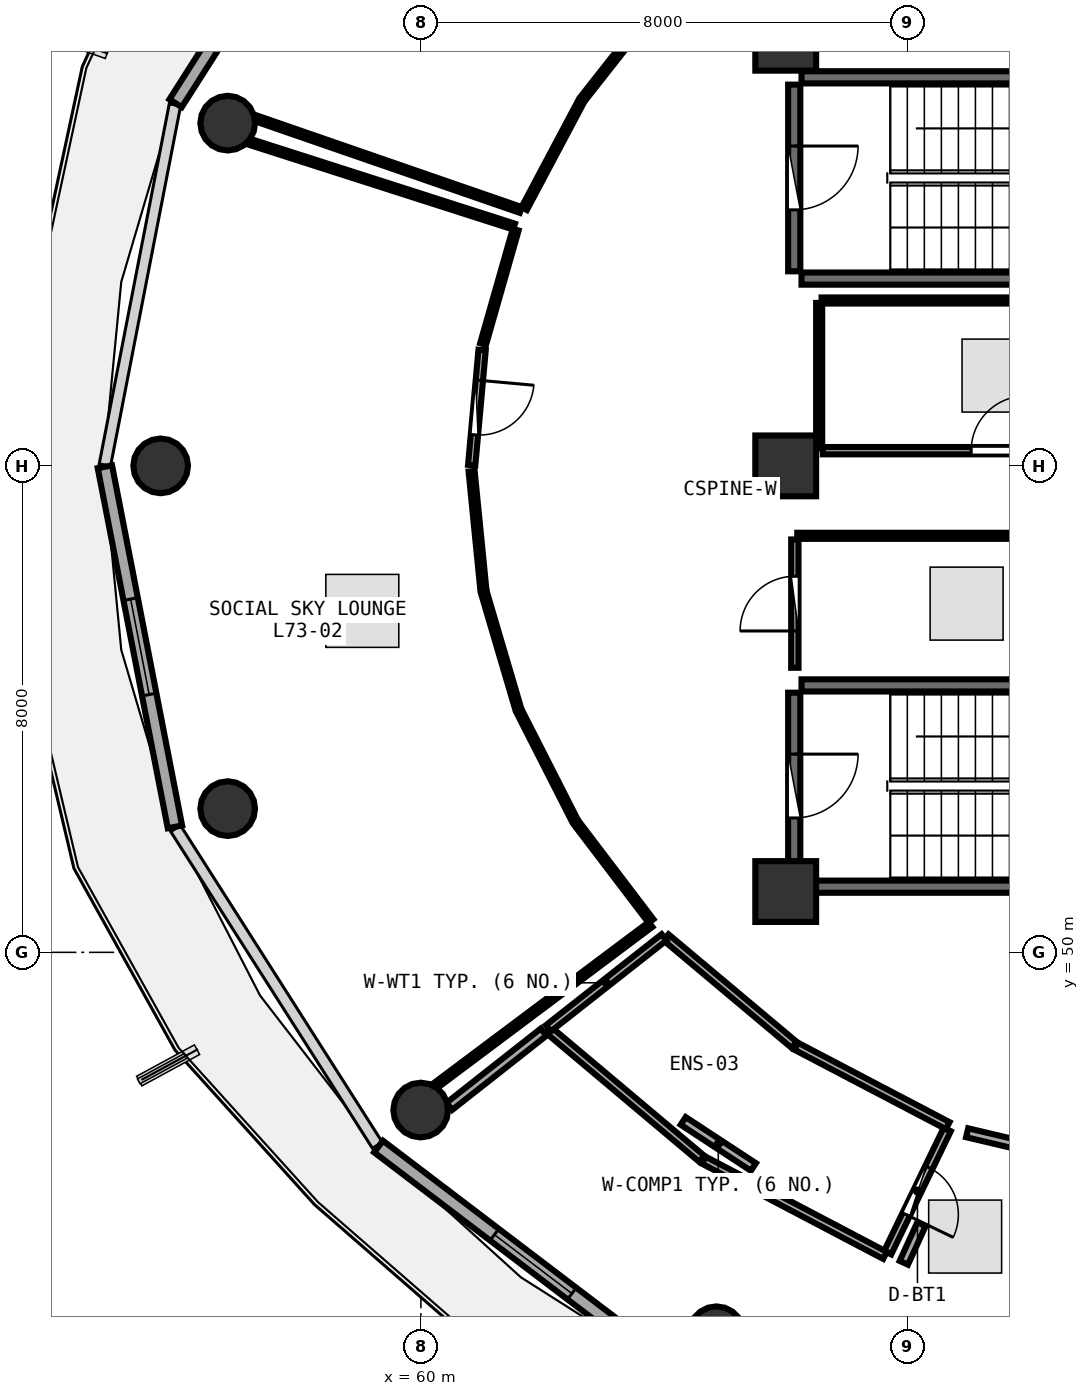
"""IFC4 building model, lengths in metres.
Left out: names, types, materials, properties, quantities, classifications, styles, units other than length and angle.
Written with IfcOpenShell. Run it as: python <this file> out.ifc"""

import sys

from ifc_helpers import new_model, si_unit, direction, frame, frame_2d, origin, origin_2d, place, context, subcontext, project, spatial, rectangle, circle, extrude, element, fill, save


model = new_model("IFC4")
c1 = context("Model", 3, precision=1e-05, world=origin(), true_north=direction((0.0, 1.0)))
c2 = subcontext(c1, "Body", "Model", "MODEL_VIEW")
j1 = project(units=[si_unit("LENGTHUNIT", "METRE"), si_unit("PLANEANGLEUNIT", "RADIAN")], contexts=[c1])
p1 = place(None, origin())
s1 = spatial("IfcSite", under=j1, at=p1, CompositionType="ELEMENT")
p2 = place(p1, origin())
s2 = spatial("IfcBuilding", under=s1, at=p2, CompositionType="ELEMENT")
p3 = place(p2, frame((0.0, 0.0, 286.2)))
s3 = spatial("IfcBuildingStorey", under=s2, at=p3, CompositionType="ELEMENT", Elevation=286.2)
for number, where, z_axis, x_axis in (
    (1, (66.0, 51.0, 0.0), (0.0, 0.0, 1.0), (1.0, 0.0, 0.0)),
    (2, (66.0, 65.0, 0.0), (0.0, 0.0, 1.0), (1.0, 0.0, 0.0)),
    (3, (66.0, 58.0, 0.0), (0.0, 0.0, 1.0), (1.0, 0.0, 0.0)),
):
    element("IfcColumn", number, at=place(p3, frame(where, z_axis=z_axis, x_axis=x_axis)), inside=s3, PredefinedType="PILASTER", context=c2, shape_type="SweptSolid", body=[
        extrude(rectangle(XDim=1.0, YDim=1.0, at=origin_2d()), origin(), (0.0, 0.0, 1.0), 3.75),
    ])
for number, where, z_axis, x_axis in (
    (4, (56.823, 63.636, 0.0), (0.0, 0.0, 1.0), (1.0, 0.0, 0.0)),
    (5, (55.72, 58.0, 0.0), (0.0, 0.0, 1.0), (1.0, 0.0, 0.0)),
    (6, (56.823, 52.364, 0.0), (0.0, 0.0, 1.0), (1.0, 0.0, 0.0)),
    (7, (59.997, 47.407, 0.0), (0.0, 0.0, 1.0), (1.0, 0.0, 0.0)),
    (8, (64.86, 43.728, 0.0), (0.0, 0.0, 1.0), (1.0, 0.0, 0.0)),
):
    element("IfcColumn", number, at=place(p3, frame(where, z_axis=z_axis, x_axis=x_axis)), inside=s3, PredefinedType="COLUMN", context=c2, shape_type="SweptSolid", body=[
        extrude(circle(Radius=0.45, at=origin_2d()), origin(), (0.0, 0.0, 1.0), 3.75),
    ])
p4 = place(p3, frame((59.284, 69.172, 0.0), z_axis=(0.0, 0.0, 1.0), x_axis=(-0.537271968456, -0.843409053728, 0.0)))
e9 = element("IfcWall", 9, at=p4, inside=s3, PredefinedType="SOLIDWALL", context=c2, shape_type="SweptSolid", body=[
    extrude(rectangle(XDim=6.175, YDim=0.24, at=frame_2d((3.087, 0.0))), origin(), (0.0, 0.0, 1.0), 3.475),
])
p5 = place(p4, frame((2.613, 0.0, 0.0)))
e10 = element("IfcOpeningElement", 10, at=p5, cuts=e9, PredefinedType="OPENING", context=c2, shape_type="SweptSolid", body=[
    extrude(rectangle(XDim=0.95, YDim=2.1, at=frame_2d((0.475, 1.05))), frame((0.0, 0.13, 0.0), z_axis=(0.0, -1.0, 0.0), x_axis=(1.0, 0.0, 0.0)), (0.0, 0.0, 1.0), 0.26),
])
p6 = place(p4, frame((3.913, 0.0, 0.85)))
e11 = element("IfcOpeningElement", 11, at=p6, cuts=e9, PredefinedType="OPENING", context=c2, shape_type="SweptSolid", body=[
    extrude(rectangle(XDim=1.2, YDim=1.45, at=frame_2d((0.6, 0.725))), frame((0.0, 0.13, 0.0), z_axis=(0.0, -1.0, 0.0), x_axis=(1.0, 0.0, 0.0)), (0.0, 0.0, 1.0), 0.26),
])
p7 = place(p3, frame((54.803, 57.985, 0.0), z_axis=(0.0, 0.0, 1.0), x_axis=(0.190969309115, -0.981596008028, 0.0)))
e12 = element("IfcWall", 12, at=p7, inside=s3, PredefinedType="SOLIDWALL", context=c2, shape_type="SweptSolid", body=[
    extrude(rectangle(XDim=6.033, YDim=0.24, at=frame_2d((3.017, 0.0))), origin(), (0.0, 0.0, 1.0), 3.475),
])
p8 = place(p7, frame((2.216, 0.0, 0.85)))
e13 = element("IfcOpeningElement", 13, at=p8, cuts=e12, PredefinedType="OPENING", context=c2, shape_type="SweptSolid", body=[
    extrude(rectangle(XDim=1.6, YDim=1.45, at=frame_2d((0.8, 0.725))), frame((0.0, 0.13, 0.0), z_axis=(0.0, -1.0, 0.0), x_axis=(1.0, 0.0, 0.0)), (0.0, 0.0, 1.0), 0.26),
])
p9 = place(p3, frame((59.304, 46.806, 0.0), z_axis=(0.0, 0.0, 1.0), x_axis=(0.796010444211, -0.605282886514, 0.0)))
e14 = element("IfcWall", 14, at=p9, inside=s3, PredefinedType="SOLIDWALL", context=c2, shape_type="SweptSolid", body=[
    extrude(rectangle(XDim=6.387, YDim=0.24, at=frame_2d((3.194, 0.0))), origin(), (0.0, 0.0, 1.0), 3.475),
])
p10 = place(p9, frame((2.394, 0.0, 0.85)))
e15 = element("IfcOpeningElement", 15, at=p10, cuts=e14, PredefinedType="OPENING", context=c2, shape_type="SweptSolid", body=[
    extrude(rectangle(XDim=1.6, YDim=1.45, at=frame_2d((0.8, 0.725))), frame((0.0, 0.13, 0.0), z_axis=(0.0, -1.0, 0.0), x_axis=(1.0, 0.0, 0.0)), (0.0, 0.0, 1.0), 0.26),
])
for number, where, z_axis, x_axis in (
    (16, (66.26, 61.08, 0.0), (0.0, 0.0, 1.0), (1.0, 0.0, 0.0)),
    (17, (73.42, 64.39, 0.0), (0.0, 0.0, 1.0), (-1.0, 0.0, 0.0)),
):
    element("IfcWall", number, at=place(p3, frame(where, z_axis=z_axis, x_axis=x_axis)), inside=s3, PredefinedType="SHEAR", context=c2, shape_type="SweptSolid", body=[
        extrude(rectangle(XDim=7.16, YDim=0.2, at=frame_2d((3.58, 0.0))), origin(), (0.0, 0.0, 1.0), 3.49),
    ])
p11 = place(p3, frame((66.14, 64.27, 0.0), z_axis=(0.0, 0.0, 1.0), x_axis=(0.0, -1.0, 0.0)))
e18 = element("IfcWall", 18, at=p11, inside=s3, PredefinedType="SHEAR", context=c2, shape_type="SweptSolid", body=[
    extrude(rectangle(XDim=3.07, YDim=0.2, at=frame_2d((1.535, 0.0))), origin(), (0.0, 0.0, 1.0), 3.49),
])
p12 = place(p11, frame((1.01, 0.0, 0.0)))
e19 = element("IfcOpeningElement", 19, at=p12, cuts=e18, PredefinedType="OPENING", context=c2, shape_type="SweptSolid", body=[
    extrude(rectangle(XDim=1.05, YDim=2.1, at=frame_2d((0.525, 1.05))), frame((0.0, 0.11, 0.0), z_axis=(0.0, -1.0, 0.0), x_axis=(1.0, 0.0, 0.0)), (0.0, 0.0, 1.0), 0.22),
])
for number, where, z_axis, x_axis in (
    (20, (66.26, 51.08, 0.0), (0.0, 0.0, 1.0), (1.0, 0.0, 0.0)),
    (21, (73.42, 54.39, 0.0), (0.0, 0.0, 1.0), (-1.0, 0.0, 0.0)),
):
    element("IfcWall", number, at=place(p3, frame(where, z_axis=z_axis, x_axis=x_axis)), inside=s3, PredefinedType="SHEAR", context=c2, shape_type="SweptSolid", body=[
        extrude(rectangle(XDim=7.16, YDim=0.2, at=frame_2d((3.58, 0.0))), origin(), (0.0, 0.0, 1.0), 3.49),
    ])
p13 = place(p3, frame((66.14, 54.27, 0.0), z_axis=(0.0, 0.0, 1.0), x_axis=(0.0, -1.0, 0.0)))
e22 = element("IfcWall", 22, at=p13, inside=s3, PredefinedType="SHEAR", context=c2, shape_type="SweptSolid", body=[
    extrude(rectangle(XDim=3.07, YDim=0.2, at=frame_2d((1.535, 0.0))), origin(), (0.0, 0.0, 1.0), 3.49),
])
p14 = place(p13, frame((1.01, 0.0, 0.0)))
e23 = element("IfcOpeningElement", 23, at=p14, cuts=e22, PredefinedType="OPENING", context=c2, shape_type="SweptSolid", body=[
    extrude(rectangle(XDim=1.05, YDim=2.1, at=frame_2d((0.525, 1.05))), frame((0.0, 0.11, 0.0), z_axis=(0.0, -1.0, 0.0), x_axis=(1.0, 0.0, 0.0)), (0.0, 0.0, 1.0), 0.22),
])
p15 = place(p3, frame((66.61, 58.25, 0.0), z_axis=(0.0, 0.0, 1.0), x_axis=(1.0, 0.0, 0.0)))
e24 = element("IfcWall", 24, at=p15, inside=s3, PredefinedType="PARTITIONING", context=c2, shape_type="SweptSolid", body=[
    extrude(rectangle(XDim=5.78, YDim=0.12, at=frame_2d((2.89, 0.0))), origin(), (0.0, 0.0, 1.0), 3.48),
])
p16 = place(p15, frame((2.44, 0.0, 0.0)))
e25 = element("IfcOpeningElement", 25, at=p16, cuts=e24, PredefinedType="OPENING", context=c2, shape_type="SweptSolid", body=[
    extrude(rectangle(XDim=0.9, YDim=2.08, at=frame_2d((0.45, 1.04))), frame((0.0, 0.07, 0.0), z_axis=(0.0, -1.0, 0.0), x_axis=(1.0, 0.0, 0.0)), (0.0, 0.0, 1.0), 0.14),
])
p17 = place(p3, frame((66.15, 54.68, 0.0), z_axis=(0.0, 0.0, 1.0), x_axis=(0.0, 1.0, 0.0)))
e26 = element("IfcWall", 26, at=p17, inside=s3, PredefinedType="PARTITIONING", context=c2, shape_type="SweptSolid", body=[
    extrude(rectangle(XDim=2.11, YDim=0.12, at=frame_2d((1.055, 0.0))), origin(), (0.0, 0.0, 1.0), 2.775),
])
p18 = place(p17, frame((0.605, 0.0, 0.0)))
e27 = element("IfcOpeningElement", 27, at=p18, cuts=e26, PredefinedType="OPENING", context=c2, shape_type="SweptSolid", body=[
    extrude(rectangle(XDim=0.9, YDim=2.08, at=frame_2d((0.45, 1.04))), frame((0.0, 0.07, 0.0), z_axis=(0.0, -1.0, 0.0), x_axis=(1.0, 0.0, 0.0)), (0.0, 0.0, 1.0), 0.14),
])
p19 = place(p3, frame((61.007, 59.906, 0.0), z_axis=(0.0, 0.0, 1.0), x_axis=(-0.089968706127, -0.995944592795, 0.0)))
e28 = element("IfcWall", 28, at=p19, inside=s3, PredefinedType="PARTITIONING", context=c2, shape_type="SweptSolid", body=[
    extrude(rectangle(XDim=1.902, YDim=0.12, at=frame_2d((0.951, 0.0))), origin(), (0.0, 0.0, 1.0), 3.075),
])
p20 = place(p19, frame((0.501, 0.0, 0.0)))
e29 = element("IfcOpeningElement", 29, at=p20, cuts=e28, PredefinedType="OPENING", context=c2, shape_type="SweptSolid", body=[
    extrude(rectangle(XDim=0.9, YDim=2.08, at=frame_2d((0.45, 1.04))), frame((0.0, 0.07, 0.0), z_axis=(0.0, -1.0, 0.0), x_axis=(1.0, 0.0, 0.0)), (0.0, 0.0, 1.0), 0.14),
])
p21 = place(p3, frame((68.656, 47.087, 0.0), z_axis=(0.0, 0.0, 1.0), x_axis=(-0.435107089182, -0.900378709735, 0.0)))
e30 = element("IfcWall", 30, at=p21, inside=s3, PredefinedType="PLUMBINGWALL", context=c2, shape_type="SweptSolid", body=[
    extrude(rectangle(XDim=2.25, YDim=0.13, at=frame_2d((1.125, 0.0))), origin(), (0.0, 0.0, 1.0), 3.175),
])
p22 = place(p21, frame((0.695, 0.0, 0.0)))
e31 = element("IfcOpeningElement", 31, at=p22, cuts=e30, PredefinedType="OPENING", context=c2, shape_type="SweptSolid", body=[
    extrude(rectangle(XDim=0.86, YDim=2.05, at=frame_2d((0.43, 1.025))), frame((0.0, 0.075, 0.0), z_axis=(0.0, -1.0, 0.0), x_axis=(1.0, 0.0, 0.0)), (0.0, 0.0, 1.0), 0.15),
])
p23 = place(p3, frame((68.983, 47.033, 0.0), z_axis=(0.0, 0.0, 1.0), x_axis=(0.973265021884, -0.229684995542, 0.0)))
e32 = element("IfcWall", 32, at=p23, inside=s3, PredefinedType="PARTITIONING", context=c2, shape_type="SweptSolid", body=[
    extrude(rectangle(XDim=3.519, YDim=0.15, at=frame_2d((1.76, 0.0))), origin(), (0.0, 0.0, 1.0), 3.075),
])
p24 = place(p23, frame((1.285, 0.0, 0.0)))
e33 = element("IfcOpeningElement", 33, at=p24, cuts=e32, PredefinedType="OPENING", context=c2, shape_type="SweptSolid", body=[
    extrude(rectangle(XDim=0.95, YDim=2.08, at=frame_2d((0.475, 1.04))), frame((0.0, 0.085, 0.0), z_axis=(0.0, -1.0, 0.0), x_axis=(1.0, 0.0, 0.0)), (0.0, 0.0, 1.0), 0.17),
])
p25 = place(p3, frame((72.41, 60.72, 0.0), z_axis=(0.0, 0.0, 1.0), x_axis=(-1.0, 0.0, 0.0)))
e34 = element("IfcWall", 34, at=p25, inside=s3, PredefinedType="PARTITIONING", context=c2, shape_type="SweptSolid", body=[
    extrude(rectangle(XDim=5.82, YDim=0.1, at=frame_2d((2.91, 0.0))), origin(), (0.0, 0.0, 1.0), 3.48),
])
p26 = place(p3, frame((66.55, 60.68, 0.0), z_axis=(0.0, 0.0, 1.0), x_axis=(0.0, -1.0, 0.0)))
e35 = element("IfcWall", 35, at=p26, inside=s3, PredefinedType="PARTITIONING", context=c2, shape_type="SweptSolid", body=[
    extrude(rectangle(XDim=2.39, YDim=0.1, at=frame_2d((1.195, 0.0))), origin(), (0.0, 0.0, 1.0), 3.48),
])
p27 = place(p3, frame((71.76, 56.85, 0.0), z_axis=(0.0, 0.0, 1.0), x_axis=(-1.0, 0.0, 0.0)))
e36 = element("IfcWall", 36, at=p27, inside=s3, PredefinedType="PARTITIONING", context=c2, shape_type="SweptSolid", body=[
    extrude(rectangle(XDim=5.57, YDim=0.1, at=frame_2d((2.785, 0.0))), origin(), (0.0, 0.0, 1.0), 2.775),
])
p28 = place(p3, frame((63.921, 65.635, 0.0), z_axis=(0.0, 0.0, 1.0), x_axis=(-0.618820199788, -0.785532660259, 0.0)))
e37 = element("IfcWall", 37, at=p28, inside=s3, PredefinedType="PARTITIONING", context=c2, shape_type="SweptSolid", body=[
    extrude(rectangle(XDim=2.018, YDim=0.1, at=frame_2d((1.009, 0.0))), origin(), (0.0, 0.0, 1.0), 3.075),
])
p29 = place(p3, frame((62.629, 63.984, 0.0), z_axis=(0.0, 0.0, 1.0), x_axis=(-0.468933294906, -0.883233584579, 0.0)))
e38 = element("IfcWall", 38, at=p29, inside=s3, PredefinedType="PARTITIONING", context=c2, shape_type="SweptSolid", body=[
    extrude(rectangle(XDim=1.984, YDim=0.1, at=frame_2d((0.992, 0.0))), origin(), (0.0, 0.0, 1.0), 3.235),
])
p30 = place(p3, frame((61.642, 62.209, 0.0), z_axis=(0.0, 0.0, 1.0), x_axis=(-0.945103281494, 0.326771766388, 0.0)))
e39 = element("IfcWall", 39, at=p30, inside=s3, PredefinedType="PARTITIONING", context=c2, shape_type="SweptSolid", body=[
    extrude(rectangle(XDim=4.604, YDim=0.1, at=frame_2d((2.302, 0.0))), origin(), (0.0, 0.0, 1.0), 3.075),
])
p31 = place(p3, frame((61.559, 61.885, 0.0), z_axis=(0.0, 0.0, 1.0), x_axis=(-0.274226302341, -0.961665188673, 0.0)))
e40 = element("IfcWall", 40, at=p31, inside=s3, PredefinedType="PARTITIONING", context=c2, shape_type="SweptSolid", body=[
    extrude(rectangle(XDim=1.955, YDim=0.1, at=frame_2d((0.978, 0.0))), origin(), (0.0, 0.0, 1.0), 3.48),
])
p32 = place(p3, frame((60.834, 57.912, 0.0), z_axis=(0.0, 0.0, 1.0), x_axis=(0.098769631998, -0.995110325439, 0.0)))
e41 = element("IfcWall", 41, at=p32, inside=s3, PredefinedType="PARTITIONING", context=c2, shape_type="SweptSolid", body=[
    extrude(rectangle(XDim=1.943, YDim=0.1, at=frame_2d((0.971, 0.0))), origin(), (0.0, 0.0, 1.0), 3.075),
])
p33 = place(p3, frame((61.041, 55.901, 0.0), z_axis=(0.0, 0.0, 1.0), x_axis=(0.28293653612, -0.959138632591, 0.0)))
e42 = element("IfcWall", 42, at=p33, inside=s3, PredefinedType="PARTITIONING", context=c2, shape_type="SweptSolid", body=[
    extrude(rectangle(XDim=1.956, YDim=0.1, at=frame_2d((0.978, 0.0))), origin(), (0.0, 0.0, 1.0), 3.48),
])
p34 = place(p3, frame((61.624, 53.95, 0.0), z_axis=(0.0, 0.0, 1.0), x_axis=(0.453658133306, -0.891175795276, 0.0)))
e43 = element("IfcWall", 43, at=p34, inside=s3, PredefinedType="PARTITIONING", context=c2, shape_type="SweptSolid", body=[
    extrude(rectangle(XDim=1.981, YDim=0.1, at=frame_2d((0.991, 0.0))), origin(), (0.0, 0.0, 1.0), 3.235),
])
p35 = place(p3, frame((62.565, 52.117, 0.0), z_axis=(0.0, 0.0, 1.0), x_axis=(0.605473441765, -0.795865510823, 0.0)))
e44 = element("IfcWall", 44, at=p35, inside=s3, PredefinedType="PARTITIONING", context=c2, shape_type="SweptSolid", body=[
    extrude(rectangle(XDim=2.014, YDim=0.1, at=frame_2d((1.007, 0.0))), origin(), (0.0, 0.0, 1.0), 3.075),
])
p36 = place(p3, frame((63.777, 50.458, 0.0), z_axis=(0.0, 0.0, 1.0), x_axis=(-0.800384816546, -0.599486568191, 0.0)))
e45 = element("IfcWall", 45, at=p36, inside=s3, PredefinedType="PARTITIONING", context=c2, shape_type="SweptSolid", body=[
    extrude(rectangle(XDim=4.414, YDim=0.1, at=frame_2d((2.207, 0.0))), origin(), (0.0, 0.0, 1.0), 3.175),
])
p37 = place(p3, frame((57.184, 63.329, 0.0), z_axis=(0.0, 0.0, 1.0), x_axis=(0.95227750557, -0.305233602976, 0.0)))
e46 = element("IfcWall", 46, at=p37, inside=s3, PredefinedType="PARTITIONING", context=c2, shape_type="SweptSolid", body=[
    extrude(rectangle(XDim=4.565, YDim=0.1, at=frame_2d((2.283, 0.0))), origin(), (0.0, 0.0, 1.0), 3.175),
])
p38 = place(p3, frame((64.03, 50.247, 0.0), z_axis=(0.0, 0.0, 1.0), x_axis=(0.766167599315, -0.642640809286, 0.0)))
e47 = element("IfcWall", 47, at=p38, inside=s3, PredefinedType="PLUMBINGWALL", context=c2, shape_type="SweptSolid", body=[
    extrude(rectangle(XDim=2.753, YDim=0.13, at=frame_2d((1.376, 0.0))), origin(), (0.0, 0.0, 1.0), 3.075),
])
p39 = place(p3, frame((66.173, 48.456, 0.0), z_axis=(0.0, 0.0, 1.0), x_axis=(0.885795858503, -0.464075098512, 0.0)))
e48 = element("IfcWall", 48, at=p39, inside=s3, PredefinedType="PLUMBINGWALL", context=c2, shape_type="SweptSolid", body=[
    extrude(rectangle(XDim=2.813, YDim=0.13, at=frame_2d((1.406, 0.0))), origin(), (0.0, 0.0, 1.0), 3.235),
])
p40 = place(p3, frame((67.633, 45.016, 0.0), z_axis=(0.0, 0.0, 1.0), x_axis=(-0.885210583291, 0.465190523581, 0.0)))
e49 = element("IfcWall", 49, at=p40, inside=s3, PredefinedType="PLUMBINGWALL", context=c2, shape_type="SweptSolid", body=[
    extrude(rectangle(XDim=3.367, YDim=0.13, at=frame_2d((1.684, 0.0))), origin(), (0.0, 0.0, 1.0), 3.075),
])
p41 = place(p3, frame((64.62, 46.605, 0.0), z_axis=(0.0, 0.0, 1.0), x_axis=(-0.765494729633, 0.643442164382, 0.0)))
e50 = element("IfcWall", 50, at=p41, inside=s3, PredefinedType="PLUMBINGWALL", context=c2, shape_type="SweptSolid", body=[
    extrude(rectangle(XDim=3.296, YDim=0.13, at=frame_2d((1.648, 0.0))), origin(), (0.0, 0.0, 1.0), 3.075),
])
p42 = place(p3, frame((62.097, 48.751, 0.0), z_axis=(0.0, 0.0, 1.0), x_axis=(0.786076764473, 0.618128886525, 0.0)))
e51 = element("IfcWall", 51, at=p42, inside=s3, PredefinedType="PLUMBINGWALL", context=c2, shape_type="SweptSolid", body=[
    extrude(rectangle(XDim=2.42, YDim=0.13, at=frame_2d((1.21, 0.0))), origin(), (0.0, 0.0, 1.0), 3.075),
])
p43 = place(p3, frame((60.468, 47.468, 0.0), z_axis=(0.0, 0.0, 1.0), x_axis=(0.785768578647, 0.618520606618, 0.0)))
e52 = element("IfcWall", 52, at=p43, inside=s3, PredefinedType="PARTITIONING", context=c2, shape_type="SweptSolid", body=[
    extrude(rectangle(XDim=1.974, YDim=0.15, at=frame_2d((0.987, 0.0))), origin(), (0.0, 0.0, 1.0), 3.075),
])
p44 = place(p3, frame((64.314, 47.228, 0.0), z_axis=(0.0, 0.0, 1.0), x_axis=(0.836108744157, -0.54856373189, 0.0)))
e53 = element("IfcWall", 53, at=p44, inside=s3, PredefinedType="PARTITIONING", context=c2, shape_type="SweptSolid", body=[
    extrude(rectangle(XDim=1.381, YDim=0.15, at=frame_2d((0.69, 0.0))), origin(), (0.0, 0.0, 1.0), 3.075),
])
p45 = place(p3, frame((67.943, 44.894, 0.0), z_axis=(0.0, 0.0, 1.0), x_axis=(0.415116627058, 0.909768204511, 0.0)))
e54 = element("IfcWall", 54, at=p45, inside=s3, PredefinedType="PARTITIONING", context=c2, shape_type="SweptSolid", body=[
    extrude(rectangle(XDim=0.7, YDim=0.15, at=frame_2d((0.35, 0.0))), origin(), (0.0, 0.0, 1.0), 3.48),
])
p46 = place(p8, origin())
e55 = element("IfcWindow", 55, at=p46, inside=s3, PartitioningType="SINGLE_PANEL", PredefinedType="WINDOW", context=c2, shape_type="SweptSolid", body=[
    extrude(rectangle(XDim=1.6, YDim=1.45, at=frame_2d((0.8, 0.725))), frame((0.0, 0.03, 0.0), z_axis=(0.0, -1.0, 0.0), x_axis=(1.0, 0.0, 0.0)), (0.0, 0.0, 1.0), 0.06),
])
fill(e13, e55)
p47 = place(p10, origin())
e56 = element("IfcWindow", 56, at=p47, inside=s3, PartitioningType="SINGLE_PANEL", PredefinedType="WINDOW", context=c2, shape_type="SweptSolid", body=[
    extrude(rectangle(XDim=1.6, YDim=1.45, at=frame_2d((0.8, 0.725))), frame((0.0, 0.03, 0.0), z_axis=(0.0, -1.0, 0.0), x_axis=(1.0, 0.0, 0.0)), (0.0, 0.0, 1.0), 0.06),
])
fill(e15, e56)
p48 = place(p12, origin())
e57 = element("IfcDoor", 57, at=p48, inside=s3, OperationType="SINGLE_SWING_LEFT", PredefinedType="DOOR", context=c2, shape_type="SweptSolid", body=[
    extrude(rectangle(XDim=1.05, YDim=2.1, at=frame_2d((0.525, 1.05))), frame((0.0, 0.025, 0.0), z_axis=(0.0, -1.0, 0.0), x_axis=(1.0, 0.0, 0.0)), (0.0, 0.0, 1.0), 0.05),
])
fill(e19, e57)
p49 = place(p14, origin())
e58 = element("IfcDoor", 58, at=p49, inside=s3, OperationType="SINGLE_SWING_LEFT", PredefinedType="DOOR", context=c2, shape_type="SweptSolid", body=[
    extrude(rectangle(XDim=1.05, YDim=2.1, at=frame_2d((0.525, 1.05))), frame((0.0, 0.025, 0.0), z_axis=(0.0, -1.0, 0.0), x_axis=(1.0, 0.0, 0.0)), (0.0, 0.0, 1.0), 0.05),
])
fill(e23, e58)
p50 = place(p16, origin())
e59 = element("IfcDoor", 59, at=p50, inside=s3, OperationType="SINGLE_SWING_RIGHT", PredefinedType="DOOR", context=c2, shape_type="SweptSolid", body=[
    extrude(rectangle(XDim=0.9, YDim=2.08, at=frame_2d((0.45, 1.04))), frame((0.0, 0.025, 0.0), z_axis=(0.0, -1.0, 0.0), x_axis=(1.0, 0.0, 0.0)), (0.0, 0.0, 1.0), 0.05),
])
fill(e25, e59)
p51 = place(p18, origin())
e60 = element("IfcDoor", 60, at=p51, inside=s3, OperationType="SINGLE_SWING_LEFT", PredefinedType="DOOR", context=c2, shape_type="SweptSolid", body=[
    extrude(rectangle(XDim=0.9, YDim=2.08, at=frame_2d((0.45, 1.04))), frame((0.0, 0.025, 0.0), z_axis=(0.0, -1.0, 0.0), x_axis=(1.0, 0.0, 0.0)), (0.0, 0.0, 1.0), 0.05),
])
fill(e27, e60)
p52 = place(p20, origin())
e61 = element("IfcDoor", 61, at=p52, inside=s3, OperationType="SINGLE_SWING_LEFT", PredefinedType="DOOR", context=c2, shape_type="SweptSolid", body=[
    extrude(rectangle(XDim=0.9, YDim=2.08, at=frame_2d((0.45, 1.04))), frame((0.0, 0.025, 0.0), z_axis=(0.0, -1.0, 0.0), x_axis=(1.0, 0.0, 0.0)), (0.0, 0.0, 1.0), 0.05),
])
fill(e29, e61)
p53 = place(p22, origin())
e62 = element("IfcDoor", 62, at=p53, inside=s3, OperationType="SINGLE_SWING_RIGHT", PredefinedType="DOOR", context=c2, shape_type="SweptSolid", body=[
    extrude(rectangle(XDim=0.86, YDim=2.05, at=frame_2d((0.43, 1.025))), frame((0.0, 0.025, 0.0), z_axis=(0.0, -1.0, 0.0), x_axis=(1.0, 0.0, 0.0)), (0.0, 0.0, 1.0), 0.05),
])
fill(e31, e62)
save(model, sys.argv[1])
